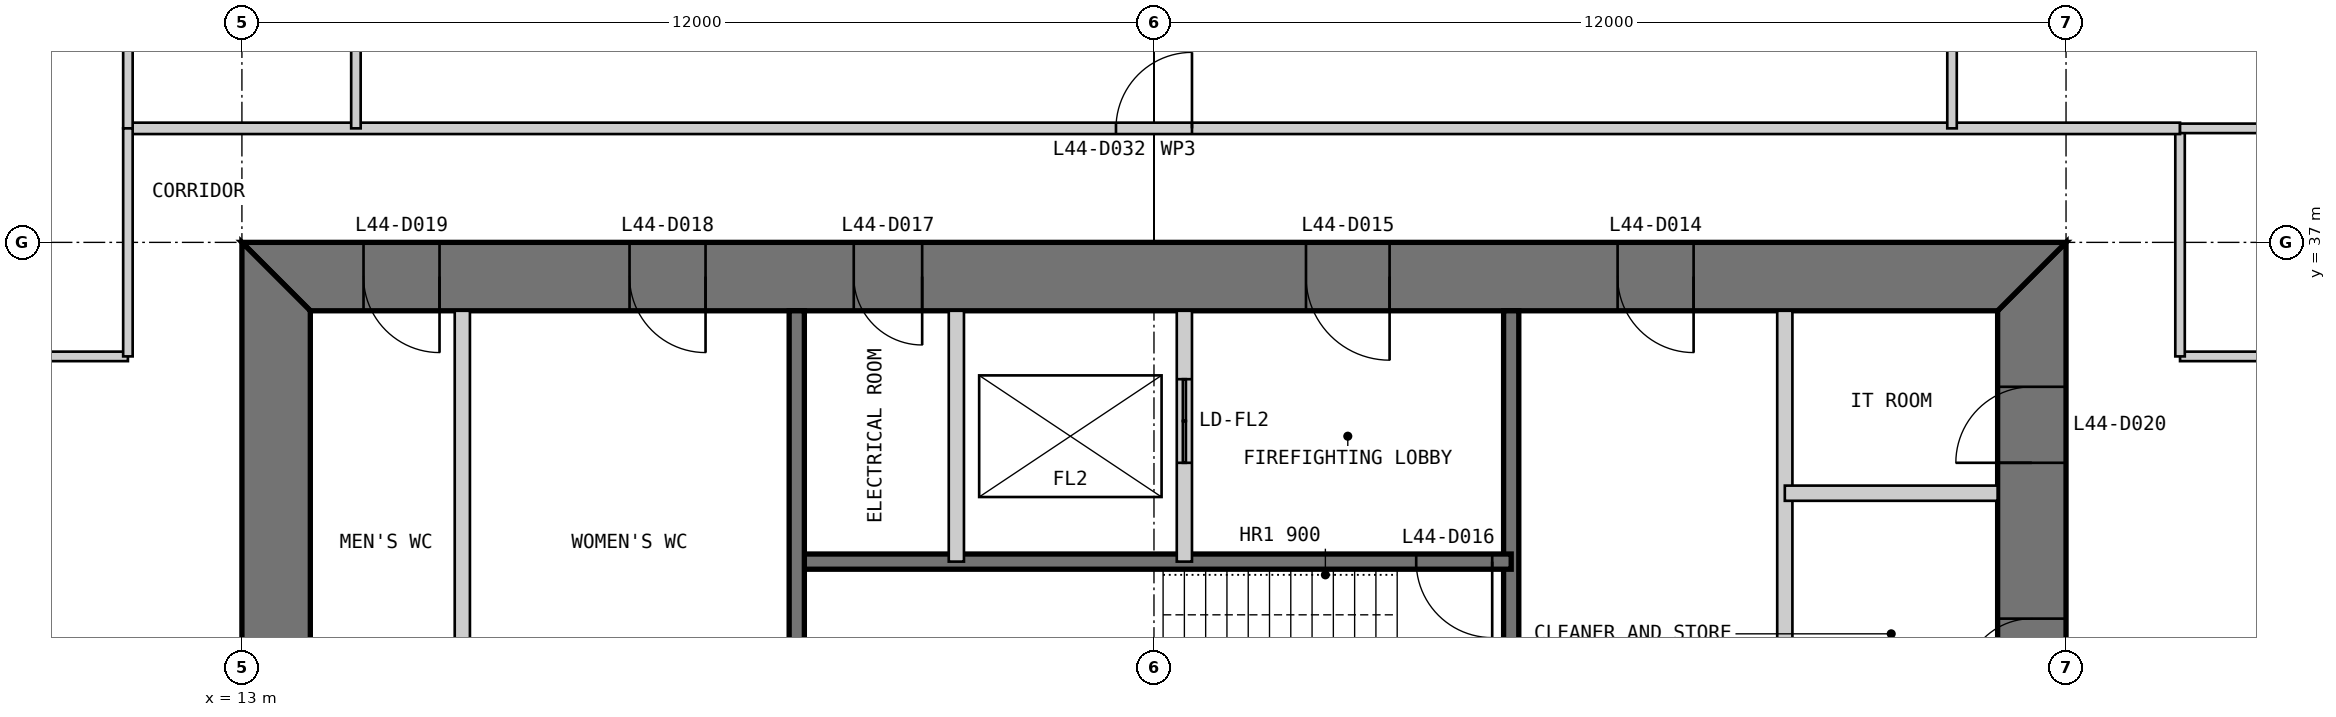
"""IFC4 building model, lengths in metres.
Left out: names, types, materials, properties, quantities, classifications, styles, units other than length and angle.
Written with IfcOpenShell. Run it as: python <this file> out.ifc"""

import sys

from ifc_helpers import new_model, si_unit, direction, frame, frame_2d, origin, place, context, subcontext, project, spatial, polyline, rectangle, outline, extrude, element, fill, save


model = new_model("IFC4")
c1 = context("Model", 3, precision=1e-05, world=origin(), true_north=direction((0.0, 1.0)))
c2 = subcontext(c1, "Body", "Model", "MODEL_VIEW")
j1 = project(units=[si_unit("LENGTHUNIT", "METRE"), si_unit("PLANEANGLEUNIT", "RADIAN")], contexts=[c1])
p1 = place(None, origin())
s1 = spatial("IfcSite", under=j1, at=p1, CompositionType="ELEMENT")
p2 = place(p1, origin())
s2 = spatial("IfcBuilding", under=s1, at=p2, CompositionType="ELEMENT")
p3 = place(p2, frame((0.0, 0.0, 189.8)))
s3 = spatial("IfcBuildingStorey", under=s2, at=p3, CompositionType="ELEMENT", Elevation=189.8)
p4 = place(p3, frame((36.55, 13.9, 0.0), z_axis=(0.0, 0.0, 1.0), x_axis=(0.0, 1.0, 0.0)))
e1 = element("IfcWall", 1, at=p4, inside=s3, PredefinedType="SHEAR", context=c2, shape_type="SweptSolid", body=[
    extrude(outline(polyline([(-0.9, -0.45), (23.1, -0.45), (22.2, 0.45), (0.0, 0.45), (-0.9, -0.45)])), origin(), (0.0, 0.0, 1.0), 4.0),
])
p5 = place(p4, frame((20.2, 0.0, 0.0)))
e2 = element("IfcOpeningElement", 2, at=p5, cuts=e1, PredefinedType="OPENING", context=c2, shape_type="SweptSolid", body=[
    extrude(rectangle(XDim=1.0, YDim=2.2, at=frame_2d((0.5, 1.1))), frame((0.0, 0.46, 0.0), z_axis=(0.0, -1.0, 0.0), x_axis=(1.0, 0.0, 0.0)), (0.0, 0.0, 1.0), 0.92),
])
p6 = place(p4, frame((17.25, 0.0, 0.0)))
e3 = element("IfcOpeningElement", 3, at=p6, cuts=e1, PredefinedType="OPENING", context=c2, shape_type="SweptSolid", body=[
    extrude(rectangle(XDim=0.9, YDim=2.2, at=frame_2d((0.45, 1.1))), frame((0.0, 0.46, 0.0), z_axis=(0.0, -1.0, 0.0), x_axis=(1.0, 0.0, 0.0)), (0.0, 0.0, 1.0), 0.92),
])
p7 = place(p3, frame((37.0, 36.55, 0.0), z_axis=(0.0, 0.0, 1.0), x_axis=(-1.0, 0.0, 0.0)))
e4 = element("IfcWall", 4, at=p7, inside=s3, PredefinedType="SHEAR", context=c2, shape_type="SweptSolid", body=[
    extrude(outline(polyline([(0.0, -0.45), (24.0, -0.45), (23.1, 0.45), (0.9, 0.45), (0.0, -0.45)])), origin(), (0.0, 0.0, 1.0), 4.0),
])
p8 = place(p7, frame((4.9, 0.0, 0.0)))
e5 = element("IfcOpeningElement", 5, at=p8, cuts=e4, PredefinedType="OPENING", context=c2, shape_type="SweptSolid", body=[
    extrude(rectangle(XDim=1.0, YDim=2.2, at=frame_2d((0.5, 1.1))), frame((0.0, 0.46, 0.0), z_axis=(0.0, -1.0, 0.0), x_axis=(1.0, 0.0, 0.0)), (0.0, 0.0, 1.0), 0.92),
])
p9 = place(p7, frame((8.9, 0.0, 0.0)))
e6 = element("IfcOpeningElement", 6, at=p9, cuts=e4, PredefinedType="OPENING", context=c2, shape_type="SweptSolid", body=[
    extrude(rectangle(XDim=1.1, YDim=2.2, at=frame_2d((0.55, 1.1))), frame((0.0, 0.46, 0.0), z_axis=(0.0, -1.0, 0.0), x_axis=(1.0, 0.0, 0.0)), (0.0, 0.0, 1.0), 0.92),
])
p10 = place(p7, frame((15.05, 0.0, 0.0)))
e7 = element("IfcOpeningElement", 7, at=p10, cuts=e4, PredefinedType="OPENING", context=c2, shape_type="SweptSolid", body=[
    extrude(rectangle(XDim=0.9, YDim=2.2, at=frame_2d((0.45, 1.1))), frame((0.0, 0.46, 0.0), z_axis=(0.0, -1.0, 0.0), x_axis=(1.0, 0.0, 0.0)), (0.0, 0.0, 1.0), 0.92),
])
p11 = place(p7, frame((17.9, 0.0, 0.0)))
e8 = element("IfcOpeningElement", 8, at=p11, cuts=e4, PredefinedType="OPENING", context=c2, shape_type="SweptSolid", body=[
    extrude(rectangle(XDim=1.0, YDim=2.2, at=frame_2d((0.5, 1.1))), frame((0.0, 0.46, 0.0), z_axis=(0.0, -1.0, 0.0), x_axis=(1.0, 0.0, 0.0)), (0.0, 0.0, 1.0), 0.92),
])
p12 = place(p7, frame((21.4, 0.0, 0.0)))
e9 = element("IfcOpeningElement", 9, at=p12, cuts=e4, PredefinedType="OPENING", context=c2, shape_type="SweptSolid", body=[
    extrude(rectangle(XDim=1.0, YDim=2.2, at=frame_2d((0.5, 1.1))), frame((0.0, 0.46, 0.0), z_axis=(0.0, -1.0, 0.0), x_axis=(1.0, 0.0, 0.0)), (0.0, 0.0, 1.0), 0.92),
])
p13 = place(p3, frame((13.45, 36.1, 0.0), z_axis=(0.0, 0.0, 1.0), x_axis=(0.0, -1.0, 0.0)))
e10 = element("IfcWall", 10, at=p13, inside=s3, PredefinedType="SHEAR", context=c2, shape_type="SweptSolid", body=[
    extrude(outline(polyline([(-0.9, -0.45), (23.1, -0.45), (22.2, 0.45), (0.0, 0.45), (-0.9, -0.45)])), origin(), (0.0, 0.0, 1.0), 4.0),
])
p14 = place(p13, frame((20.2, 0.0, 0.0)))
e11 = element("IfcOpeningElement", 11, at=p14, cuts=e10, PredefinedType="OPENING", context=c2, shape_type="SweptSolid", body=[
    extrude(rectangle(XDim=1.0, YDim=2.2, at=frame_2d((0.5, 1.1))), frame((0.0, 0.46, 0.0), z_axis=(0.0, -1.0, 0.0), x_axis=(1.0, 0.0, 0.0)), (0.0, 0.0, 1.0), 0.92),
])
p15 = place(p13, frame((17.25, 0.0, 0.0)))
e12 = element("IfcOpeningElement", 12, at=p15, cuts=e10, PredefinedType="OPENING", context=c2, shape_type="SweptSolid", body=[
    extrude(rectangle(XDim=0.9, YDim=2.2, at=frame_2d((0.45, 1.1))), frame((0.0, 0.46, 0.0), z_axis=(0.0, -1.0, 0.0), x_axis=(1.0, 0.0, 0.0)), (0.0, 0.0, 1.0), 0.92),
])
p16 = place(p3, frame((33.3, 36.1, 0.0), z_axis=(0.0, 0.0, 1.0), x_axis=(0.0, -1.0, 0.0)))
e13 = element("IfcWall", 13, at=p16, inside=s3, PredefinedType="PARTITIONING", context=c2, shape_type="SweptSolid", body=[
    extrude(rectangle(XDim=16.1, YDim=0.2, at=frame_2d((8.05, 0.0))), origin(), (0.0, 0.0, 1.0), 3.8),
])
p17 = place(p3, frame((29.7, 36.1, 0.0), z_axis=(0.0, 0.0, 1.0), x_axis=(0.0, -1.0, 0.0)))
e14 = element("IfcWall", 14, at=p17, inside=s3, PredefinedType="SOLIDWALL", context=c2, shape_type="SweptSolid", body=[
    extrude(rectangle(XDim=16.1, YDim=0.2, at=frame_2d((8.05, 0.0))), origin(), (0.0, 0.0, 1.0), 3.8),
])
p18 = place(p17, frame((7.217, 0.0, 0.0)))
e15 = element("IfcOpeningElement", 15, at=p18, cuts=e14, PredefinedType="OPENING", context=c2, shape_type="SweptSolid", body=[
    extrude(rectangle(XDim=1.1, YDim=2.2, at=frame_2d((0.55, 1.1))), frame((0.0, 0.11, 0.0), z_axis=(0.0, -1.0, 0.0), x_axis=(1.0, 0.0, 0.0)), (0.0, 0.0, 1.0), 0.22),
])
p19 = place(p17, frame((10.55, 0.0, 0.0)))
e16 = element("IfcOpeningElement", 16, at=p19, cuts=e14, PredefinedType="OPENING", context=c2, shape_type="SweptSolid", body=[
    extrude(rectangle(XDim=1.1, YDim=2.2, at=frame_2d((0.55, 1.1))), frame((0.0, 0.11, 0.0), z_axis=(0.0, -1.0, 0.0), x_axis=(1.0, 0.0, 0.0)), (0.0, 0.0, 1.0), 0.22),
])
p20 = place(p17, frame((13.883, 0.0, 0.0)))
e17 = element("IfcOpeningElement", 17, at=p20, cuts=e14, PredefinedType="OPENING", context=c2, shape_type="SweptSolid", body=[
    extrude(rectangle(XDim=1.1, YDim=2.2, at=frame_2d((0.55, 1.1))), frame((0.0, 0.11, 0.0), z_axis=(0.0, -1.0, 0.0), x_axis=(1.0, 0.0, 0.0)), (0.0, 0.0, 1.0), 0.22),
])
p21 = place(p3, frame((29.7, 32.8, 0.0), z_axis=(0.0, 0.0, 1.0), x_axis=(-1.0, 0.0, 0.0)))
e18 = element("IfcWall", 18, at=p21, inside=s3, PredefinedType="SOLIDWALL", context=c2, shape_type="SweptSolid", body=[
    extrude(rectangle(XDim=9.4, YDim=0.2, at=frame_2d((4.7, 0.0))), origin(), (0.0, 0.0, 1.0), 3.8),
])
p22 = place(p21, frame((0.25, 0.0, 0.0)))
e19 = element("IfcOpeningElement", 19, at=p22, cuts=e18, PredefinedType="OPENING", context=c2, shape_type="SweptSolid", body=[
    extrude(rectangle(XDim=1.0, YDim=2.2, at=frame_2d((0.5, 1.1))), frame((0.0, 0.11, 0.0), z_axis=(0.0, -1.0, 0.0), x_axis=(1.0, 0.0, 0.0)), (0.0, 0.0, 1.0), 0.22),
])
p23 = place(p3, frame((25.4, 36.1, 0.0), z_axis=(0.0, 0.0, 1.0), x_axis=(0.0, -1.0, 0.0)))
e20 = element("IfcWall", 20, at=p23, inside=s3, PredefinedType="PARTITIONING", context=c2, shape_type="SweptSolid", body=[
    extrude(rectangle(XDim=3.3, YDim=0.2, at=frame_2d((1.65, 0.0))), origin(), (0.0, 0.0, 1.0), 3.8),
])
p24 = place(p23, frame((0.9, 0.0, 0.0)))
e21 = element("IfcOpeningElement", 21, at=p24, cuts=e20, PredefinedType="OPENING", context=c2, shape_type="SweptSolid", body=[
    extrude(rectangle(XDim=1.1, YDim=2.2, at=frame_2d((0.55, 1.1))), frame((0.0, 0.11, 0.0), z_axis=(0.0, -1.0, 0.0), x_axis=(1.0, 0.0, 0.0)), (0.0, 0.0, 1.0), 0.22),
])
p25 = place(p3, frame((22.4, 36.1, 0.0), z_axis=(0.0, 0.0, 1.0), x_axis=(0.0, -1.0, 0.0)))
e22 = element("IfcWall", 22, at=p25, inside=s3, PredefinedType="PARTITIONING", context=c2, shape_type="SweptSolid", body=[
    extrude(rectangle(XDim=3.3, YDim=0.2, at=frame_2d((1.65, 0.0))), origin(), (0.0, 0.0, 1.0), 3.8),
])
p26 = place(p3, frame((20.3, 36.1, 0.0), z_axis=(0.0, 0.0, 1.0), x_axis=(0.0, -1.0, 0.0)))
e23 = element("IfcWall", 23, at=p26, inside=s3, PredefinedType="SOLIDWALL", context=c2, shape_type="SweptSolid", body=[
    extrude(rectangle(XDim=6.1, YDim=0.2, at=frame_2d((3.05, 0.0))), origin(), (0.0, 0.0, 1.0), 3.8),
])
p27 = place(p3, frame((15.9, 36.1, 0.0), z_axis=(0.0, 0.0, 1.0), x_axis=(0.0, -1.0, 0.0)))
e24 = element("IfcWall", 24, at=p27, inside=s3, PredefinedType="PARTITIONING", context=c2, shape_type="SweptSolid", body=[
    extrude(rectangle(XDim=6.1, YDim=0.2, at=frame_2d((3.05, 0.0))), origin(), (0.0, 0.0, 1.0), 3.8),
])
p28 = place(p3, frame((36.1, 33.7, 0.0), z_axis=(0.0, 0.0, 1.0), x_axis=(-1.0, 0.0, 0.0)))
e25 = element("IfcWall", 25, at=p28, inside=s3, PredefinedType="PARTITIONING", context=c2, shape_type="SweptSolid", body=[
    extrude(rectangle(XDim=2.8, YDim=0.2, at=frame_2d((1.4, 0.0))), origin(), (0.0, 0.0, 1.0), 3.8),
])
p29 = place(p3, frame((44.5, 35.5, 0.0), z_axis=(0.0, 0.0, 1.0), x_axis=(-1.0, 0.0, 0.0)))
e26 = element("IfcWall", 26, at=p29, inside=s3, PredefinedType="PARTITIONING", context=c2, shape_type="SweptSolid", body=[
    extrude(rectangle(XDim=6.0, YDim=0.125, at=frame_2d((3.0, 0.0))), origin(), (0.0, 0.0, 1.0), 3.85),
])
p30 = place(p29, frame((2.55, 0.0, 0.0)))
e27 = element("IfcOpeningElement", 27, at=p30, cuts=e26, PredefinedType="OPENING", context=c2, shape_type="SweptSolid", body=[
    extrude(rectangle(XDim=0.9, YDim=2.2, at=frame_2d((0.45, 1.1))), frame((0.0, 0.073, 0.0), z_axis=(0.0, -1.0, 0.0), x_axis=(1.0, 0.0, 0.0)), (0.0, 0.0, 1.0), 0.145),
])
p31 = place(p3, frame((38.5, 35.5, 0.0), z_axis=(0.0, 0.0, 1.0), x_axis=(0.0, 1.0, 0.0)))
e28 = element("IfcWall", 28, at=p31, inside=s3, PredefinedType="PARTITIONING", context=c2, shape_type="SweptSolid", body=[
    extrude(rectangle(XDim=3.0, YDim=0.125, at=frame_2d((1.5, 0.0))), origin(), (0.0, 0.0, 1.0), 3.85),
])
p32 = place(p3, frame((38.5, 38.5, 0.0), z_axis=(0.0, 0.0, 1.0), x_axis=(-1.0, 0.0, 0.0)))
e29 = element("IfcWall", 29, at=p32, inside=s3, PredefinedType="PARTITIONING", context=c2, shape_type="SweptSolid", body=[
    extrude(rectangle(XDim=27.0, YDim=0.15, at=frame_2d((13.5, 0.0))), origin(), (0.0, 0.0, 1.0), 3.85),
])
p33 = place(p32, frame((13.0, 0.0, 0.0)))
e30 = element("IfcOpeningElement", 30, at=p33, cuts=e29, PredefinedType="OPENING", context=c2, shape_type="SweptSolid", body=[
    extrude(rectangle(XDim=1.0, YDim=2.2, at=frame_2d((0.5, 1.1))), frame((0.0, 0.085, 0.0), z_axis=(0.0, -1.0, 0.0), x_axis=(1.0, 0.0, 0.0)), (0.0, 0.0, 1.0), 0.17),
])
p34 = place(p3, frame((49.85, 38.5, 0.0), z_axis=(0.0, 0.0, 1.0), x_axis=(-1.0, 0.0, 0.0)))
e31 = element("IfcWall", 31, at=p34, inside=s3, PredefinedType="PARTITIONING", context=c2, shape_type="SweptSolid", body=[
    extrude(rectangle(XDim=11.35, YDim=0.125, at=frame_2d((5.675, 0.0))), origin(), (0.0, 0.0, 1.0), 3.85),
])
p35 = place(p3, frame((35.5, 49.85, 0.0), z_axis=(0.0, 0.0, 1.0), x_axis=(0.0, -1.0, 0.0)))
e32 = element("IfcWall", 32, at=p35, inside=s3, PredefinedType="PARTITIONING", context=c2, shape_type="SweptSolid", body=[
    extrude(rectangle(XDim=11.35, YDim=0.125, at=frame_2d((5.675, 0.0))), origin(), (0.0, 0.0, 1.0), 3.85),
])
p36 = place(p35, frame((7.9, 0.0, 0.0)))
e33 = element("IfcOpeningElement", 33, at=p36, cuts=e32, PredefinedType="OPENING", context=c2, shape_type="SweptSolid", body=[
    extrude(rectangle(XDim=0.9, YDim=2.2, at=frame_2d((0.45, 1.1))), frame((0.0, 0.073, 0.0), z_axis=(0.0, -1.0, 0.0), x_axis=(1.0, 0.0, 0.0)), (0.0, 0.0, 1.0), 0.145),
])
p37 = place(p3, frame((14.5, 44.5, 0.0), z_axis=(0.0, 0.0, 1.0), x_axis=(0.0, -1.0, 0.0)))
e34 = element("IfcWall", 34, at=p37, inside=s3, PredefinedType="PARTITIONING", context=c2, shape_type="SweptSolid", body=[
    extrude(rectangle(XDim=6.0, YDim=0.125, at=frame_2d((3.0, 0.0))), origin(), (0.0, 0.0, 1.0), 3.85),
])
p38 = place(p37, frame((2.55, 0.0, 0.0)))
e35 = element("IfcOpeningElement", 35, at=p38, cuts=e34, PredefinedType="OPENING", context=c2, shape_type="SweptSolid", body=[
    extrude(rectangle(XDim=0.9, YDim=2.2, at=frame_2d((0.45, 1.1))), frame((0.0, 0.073, 0.0), z_axis=(0.0, -1.0, 0.0), x_axis=(1.0, 0.0, 0.0)), (0.0, 0.0, 1.0), 0.145),
])
p39 = place(p3, frame((11.5, 49.85, 0.0), z_axis=(0.0, 0.0, 1.0), x_axis=(0.0, -1.0, 0.0)))
e36 = element("IfcWall", 36, at=p39, inside=s3, PredefinedType="PARTITIONING", context=c2, shape_type="SweptSolid", body=[
    extrude(rectangle(XDim=11.35, YDim=0.125, at=frame_2d((5.675, 0.0))), origin(), (0.0, 0.0, 1.0), 3.85),
])
p40 = place(p3, frame((0.15, 35.5, 0.0), z_axis=(0.0, 0.0, 1.0), x_axis=(1.0, 0.0, 0.0)))
e37 = element("IfcWall", 37, at=p40, inside=s3, PredefinedType="PARTITIONING", context=c2, shape_type="SweptSolid", body=[
    extrude(rectangle(XDim=11.35, YDim=0.125, at=frame_2d((5.675, 0.0))), origin(), (0.0, 0.0, 1.0), 3.85),
])
p41 = place(p40, frame((7.9, 0.0, 0.0)))
e38 = element("IfcOpeningElement", 38, at=p41, cuts=e37, PredefinedType="OPENING", context=c2, shape_type="SweptSolid", body=[
    extrude(rectangle(XDim=0.9, YDim=2.2, at=frame_2d((0.45, 1.1))), frame((0.0, 0.073, 0.0), z_axis=(0.0, -1.0, 0.0), x_axis=(1.0, 0.0, 0.0)), (0.0, 0.0, 1.0), 0.145),
])
p42 = place(p3, frame((11.5, 38.5, 0.0), z_axis=(0.0, 0.0, 1.0), x_axis=(0.0, -1.0, 0.0)))
e39 = element("IfcWall", 39, at=p42, inside=s3, PredefinedType="PARTITIONING", context=c2, shape_type="SweptSolid", body=[
    extrude(rectangle(XDim=3.0, YDim=0.125, at=frame_2d((1.5, 0.0))), origin(), (0.0, 0.0, 1.0), 3.85),
])
p43 = place(p8, origin())
e40 = element("IfcDoor", 40, at=p43, inside=s3, OperationType="SINGLE_SWING_LEFT", PredefinedType="DOOR", context=c2, shape_type="SweptSolid", body=[
    extrude(rectangle(XDim=1.0, YDim=2.2, at=frame_2d((0.5, 1.1))), frame((0.0, 0.025, 0.0), z_axis=(0.0, -1.0, 0.0), x_axis=(1.0, 0.0, 0.0)), (0.0, 0.0, 1.0), 0.05),
    extrude(outline(polyline([(0.0, 0.0), (0.04, 0.0), (0.04, 2.16), (0.96, 2.16), (0.96, 0.0), (1.0, 0.0), (1.0, 2.2), (0.0, 2.2), (0.0, 0.0)])), frame((0.0, 0.3, 0.0), z_axis=(0.0, -1.0, 0.0), x_axis=(1.0, 0.0, 0.0)), (0.0, 0.0, 1.0), 0.6),
])
fill(e5, e40)
p44 = place(p9, origin())
e41 = element("IfcDoor", 41, at=p44, inside=s3, OperationType="SINGLE_SWING_LEFT", PredefinedType="DOOR", context=c2, shape_type="SweptSolid", body=[
    extrude(rectangle(XDim=1.1, YDim=2.2, at=frame_2d((0.55, 1.1))), frame((0.0, 0.025, 0.0), z_axis=(0.0, -1.0, 0.0), x_axis=(1.0, 0.0, 0.0)), (0.0, 0.0, 1.0), 0.05),
    extrude(outline(polyline([(0.0, 0.0), (0.04, 0.0), (0.04, 2.16), (1.06, 2.16), (1.06, 0.0), (1.1, 0.0), (1.1, 2.2), (0.0, 2.2), (0.0, 0.0)])), frame((0.0, 0.3, 0.0), z_axis=(0.0, -1.0, 0.0), x_axis=(1.0, 0.0, 0.0)), (0.0, 0.0, 1.0), 0.6),
])
fill(e6, e41)
p45 = place(p22, origin())
e42 = element("IfcDoor", 42, at=p45, inside=s3, OperationType="SINGLE_SWING_LEFT", PredefinedType="DOOR", context=c2, shape_type="SweptSolid", body=[
    extrude(rectangle(XDim=1.0, YDim=2.2, at=frame_2d((0.5, 1.1))), frame((0.0, 0.025, 0.0), z_axis=(0.0, -1.0, 0.0), x_axis=(1.0, 0.0, 0.0)), (0.0, 0.0, 1.0), 0.05),
])
fill(e19, e42)
p46 = place(p10, origin())
e43 = element("IfcDoor", 43, at=p46, inside=s3, OperationType="SINGLE_SWING_LEFT", PredefinedType="DOOR", context=c2, shape_type="SweptSolid", body=[
    extrude(rectangle(XDim=0.9, YDim=2.2, at=frame_2d((0.45, 1.1))), frame((0.0, 0.025, 0.0), z_axis=(0.0, -1.0, 0.0), x_axis=(1.0, 0.0, 0.0)), (0.0, 0.0, 1.0), 0.05),
    extrude(outline(polyline([(0.0, 0.0), (0.04, 0.0), (0.04, 2.16), (0.86, 2.16), (0.86, 0.0), (0.9, 0.0), (0.9, 2.2), (0.0, 2.2), (0.0, 0.0)])), frame((0.0, 0.3, 0.0), z_axis=(0.0, -1.0, 0.0), x_axis=(1.0, 0.0, 0.0)), (0.0, 0.0, 1.0), 0.6),
])
fill(e7, e43)
p47 = place(p11, origin())
e44 = element("IfcDoor", 44, at=p47, inside=s3, OperationType="SINGLE_SWING_LEFT", PredefinedType="DOOR", context=c2, shape_type="SweptSolid", body=[
    extrude(rectangle(XDim=1.0, YDim=2.2, at=frame_2d((0.5, 1.1))), frame((0.0, 0.025, 0.0), z_axis=(0.0, -1.0, 0.0), x_axis=(1.0, 0.0, 0.0)), (0.0, 0.0, 1.0), 0.05),
    extrude(outline(polyline([(0.0, 0.0), (0.04, 0.0), (0.04, 2.16), (0.96, 2.16), (0.96, 0.0), (1.0, 0.0), (1.0, 2.2), (0.0, 2.2), (0.0, 0.0)])), frame((0.0, 0.3, 0.0), z_axis=(0.0, -1.0, 0.0), x_axis=(1.0, 0.0, 0.0)), (0.0, 0.0, 1.0), 0.6),
])
fill(e8, e44)
p48 = place(p12, origin())
e45 = element("IfcDoor", 45, at=p48, inside=s3, OperationType="SINGLE_SWING_LEFT", PredefinedType="DOOR", context=c2, shape_type="SweptSolid", body=[
    extrude(rectangle(XDim=1.0, YDim=2.2, at=frame_2d((0.5, 1.1))), frame((0.0, 0.025, 0.0), z_axis=(0.0, -1.0, 0.0), x_axis=(1.0, 0.0, 0.0)), (0.0, 0.0, 1.0), 0.05),
    extrude(outline(polyline([(0.0, 0.0), (0.04, 0.0), (0.04, 2.16), (0.96, 2.16), (0.96, 0.0), (1.0, 0.0), (1.0, 2.2), (0.0, 2.2), (0.0, 0.0)])), frame((0.0, 0.3, 0.0), z_axis=(0.0, -1.0, 0.0), x_axis=(1.0, 0.0, 0.0)), (0.0, 0.0, 1.0), 0.6),
])
fill(e9, e45)
p49 = place(p5, origin())
e46 = element("IfcDoor", 46, at=p49, inside=s3, OperationType="SINGLE_SWING_LEFT", PredefinedType="DOOR", context=c2, shape_type="SweptSolid", body=[
    extrude(rectangle(XDim=1.0, YDim=2.2, at=frame_2d((0.5, 1.1))), frame((0.0, 0.025, 0.0), z_axis=(0.0, -1.0, 0.0), x_axis=(1.0, 0.0, 0.0)), (0.0, 0.0, 1.0), 0.05),
    extrude(outline(polyline([(0.0, 0.0), (0.04, 0.0), (0.04, 2.16), (0.96, 2.16), (0.96, 0.0), (1.0, 0.0), (1.0, 2.2), (0.0, 2.2), (0.0, 0.0)])), frame((0.0, 0.3, 0.0), z_axis=(0.0, -1.0, 0.0), x_axis=(1.0, 0.0, 0.0)), (0.0, 0.0, 1.0), 0.6),
])
fill(e2, e46)
p50 = place(p6, origin())
e47 = element("IfcDoor", 47, at=p50, inside=s3, OperationType="SINGLE_SWING_LEFT", PredefinedType="DOOR", context=c2, shape_type="SweptSolid", body=[
    extrude(rectangle(XDim=0.9, YDim=2.2, at=frame_2d((0.45, 1.1))), frame((0.0, 0.025, 0.0), z_axis=(0.0, -1.0, 0.0), x_axis=(1.0, 0.0, 0.0)), (0.0, 0.0, 1.0), 0.05),
    extrude(outline(polyline([(0.0, 0.0), (0.04, 0.0), (0.04, 2.16), (0.86, 2.16), (0.86, 0.0), (0.9, 0.0), (0.9, 2.2), (0.0, 2.2), (0.0, 0.0)])), frame((0.0, 0.3, 0.0), z_axis=(0.0, -1.0, 0.0), x_axis=(1.0, 0.0, 0.0)), (0.0, 0.0, 1.0), 0.6),
])
fill(e3, e47)
p51 = place(p33, frame((1.0, 0.0, 0.0), z_axis=(0.0, 0.0, 1.0), x_axis=(-1.0, 0.0, 0.0)))
e48 = element("IfcDoor", 48, at=p51, inside=s3, OperationType="SINGLE_SWING_RIGHT", PredefinedType="DOOR", context=c2, shape_type="SweptSolid", body=[
    extrude(rectangle(XDim=1.0, YDim=2.2, at=frame_2d((0.5, 1.1))), frame((0.0, 0.025, 0.0), z_axis=(0.0, -1.0, 0.0), x_axis=(1.0, 0.0, 0.0)), (0.0, 0.0, 1.0), 0.05),
])
fill(e30, e48)
p52 = place(p24, origin())
e49 = element("IfcDoor", 49, at=p52, inside=s3, OperationType="DOUBLE_DOOR_SLIDING", PredefinedType="DOOR", context=c2, shape_type="SweptSolid", body=[
    extrude(rectangle(XDim=1.1, YDim=2.2, at=frame_2d((0.55, 1.1))), frame((0.0, 0.025, 0.0), z_axis=(0.0, -1.0, 0.0), x_axis=(1.0, 0.0, 0.0)), (0.0, 0.0, 1.0), 0.05),
])
fill(e21, e49)
save(model, sys.argv[1])
